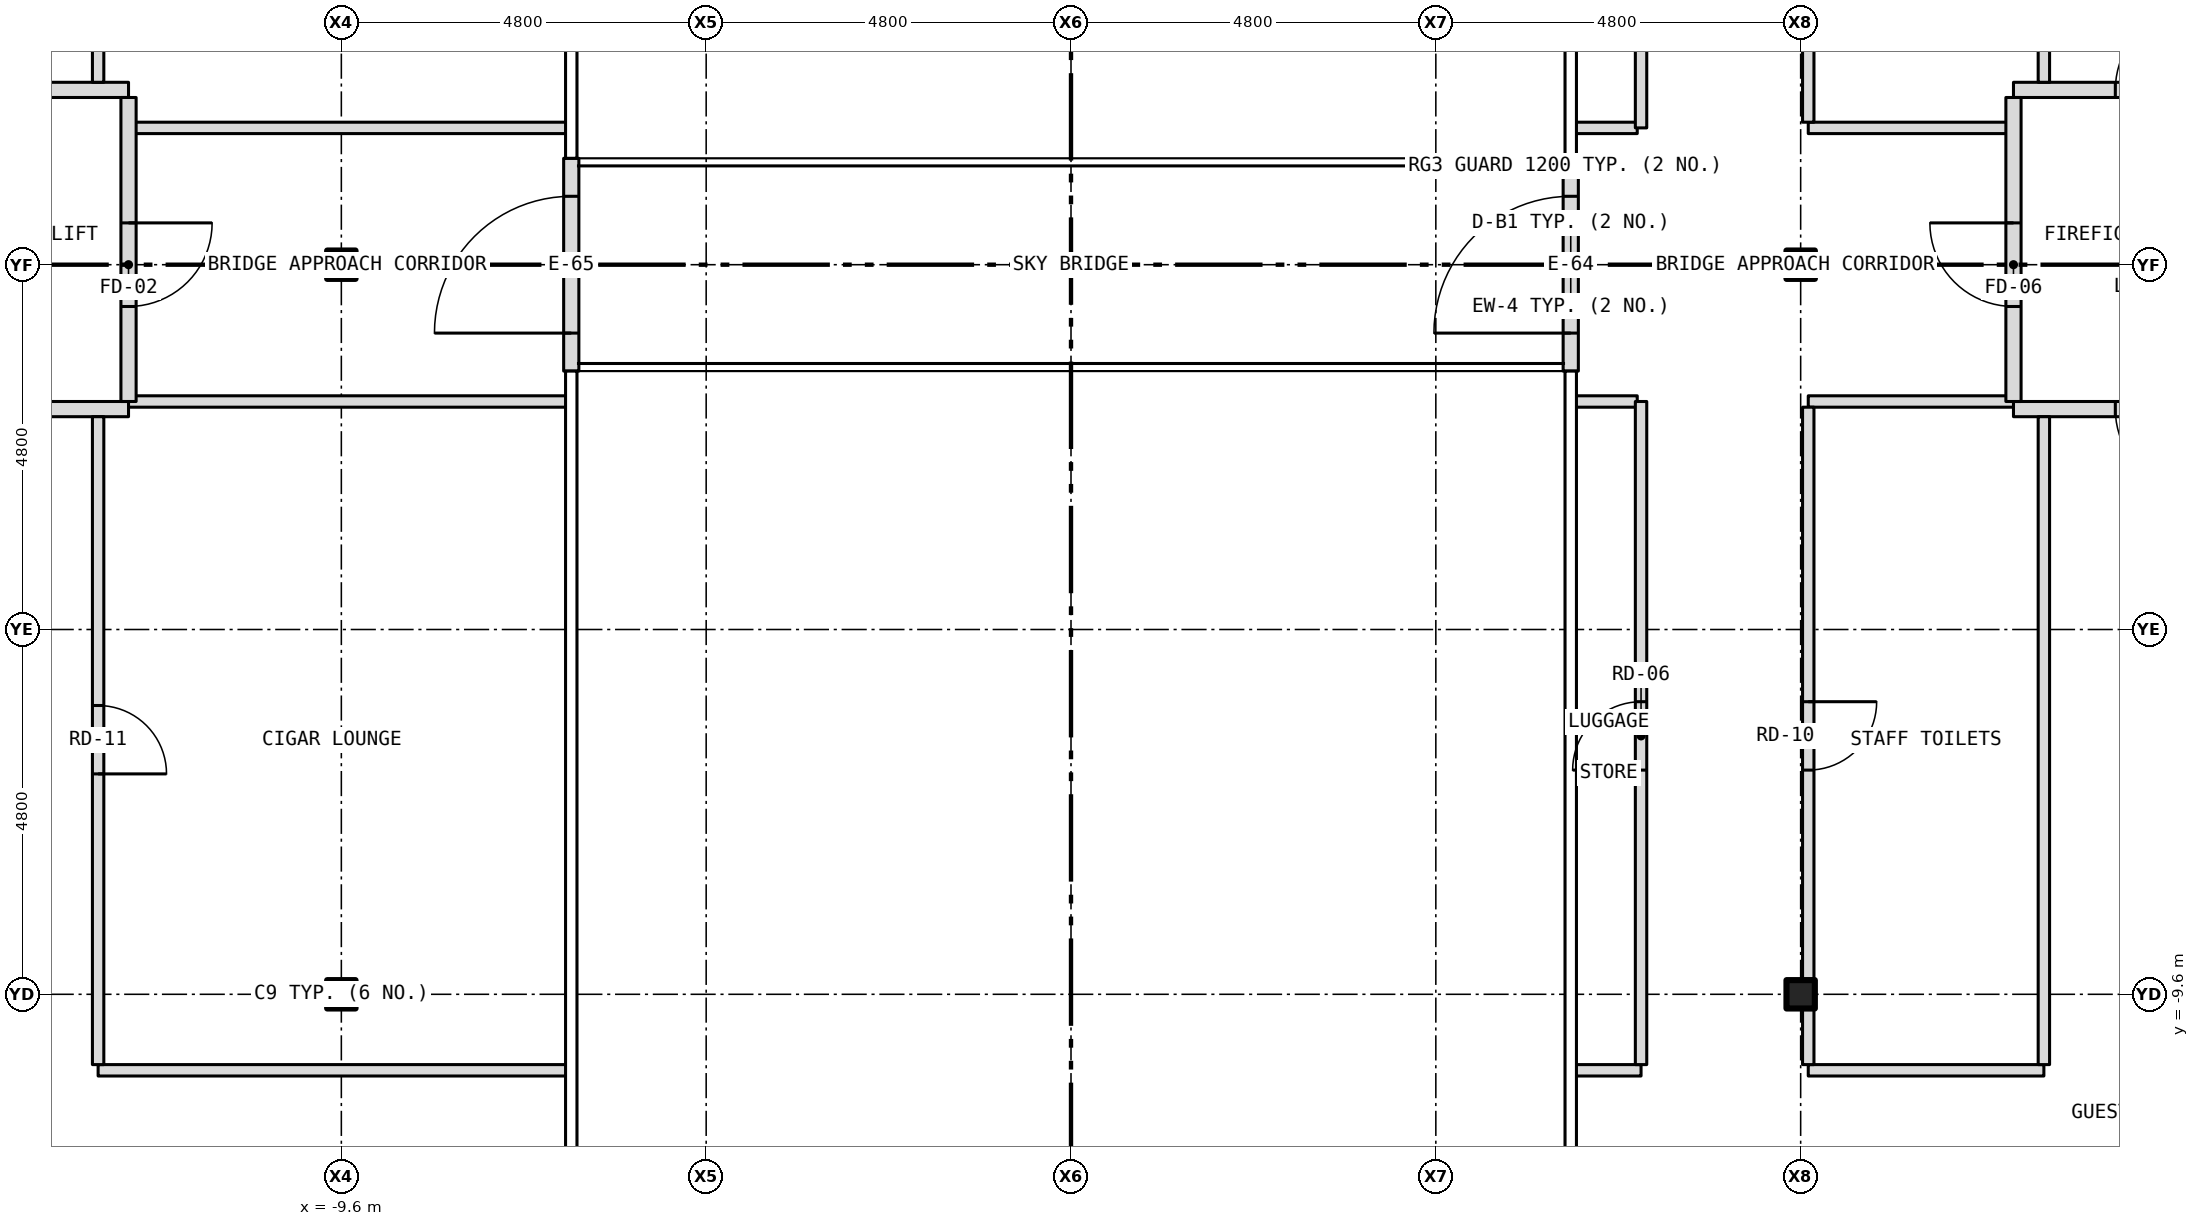
"""IFC4 building model, lengths in metres.
Left out: names, types, materials, properties, quantities, classifications, styles, units other than length and angle.
Written with IfcOpenShell. Run it as: python <this file> out.ifc"""

import sys

from ifc_helpers import new_model, si_unit, direction, frame, frame_2d, origin, origin_2d, place, context, subcontext, project, spatial, rectangle, i_section, extrude, element, fill, save


model = new_model("IFC4")
c1 = context("Model", 3, precision=1e-05, world=origin(), true_north=direction((0.0, 1.0)))
c2 = subcontext(c1, "Body", "Model", "MODEL_VIEW")
j1 = project(units=[si_unit("LENGTHUNIT", "METRE"), si_unit("PLANEANGLEUNIT", "RADIAN")], contexts=[c1])
p1 = place(None, origin())
s1 = spatial("IfcSite", under=j1, at=p1, CompositionType="ELEMENT")
p2 = place(p1, origin())
s2 = spatial("IfcBuilding", under=s1, at=p2, CompositionType="ELEMENT")
p3 = place(p2, frame((0.0, 0.0, 233.0)))
s3 = spatial("IfcBuildingStorey", under=s2, at=p3, CompositionType="ELEMENT", Elevation=233.0)
for number, where, z_axis, x_axis in (
    (1, (-9.6, -9.6, -0.15), (0.0, 0.0, 1.0), (1.0, 0.0, 0.0)),
    (2, (-9.6, 0.0, -0.15), (0.0, 0.0, 1.0), (1.0, 0.0, 0.0)),
    (3, (9.6, -9.6, -0.15), (0.0, 0.0, 1.0), (1.0, 0.0, 0.0)),
    (4, (9.6, 0.0, -0.15), (0.0, 0.0, 1.0), (1.0, 0.0, 0.0)),
):
    element("IfcColumn", number, at=place(p3, frame(where, z_axis=z_axis, x_axis=x_axis)), inside=s3, PredefinedType="COLUMN", context=c2, shape_type="SweptSolid", body=[
        extrude(i_section(OverallWidth=0.373, OverallDepth=0.373, WebThickness=0.016, FlangeThickness=0.026, at=origin_2d()), origin(), (0.0, 0.0, 1.0), 3.35),
    ])
p4 = place(p3, frame((6.575, -1.4, 0.0), z_axis=(0.0, 0.0, 1.0), x_axis=(0.0, 1.0, 0.0)))
e5 = element("IfcWall", 5, at=p4, inside=s3, PredefinedType="SOLIDWALL", context=c2, shape_type="SweptSolid", body=[
    extrude(rectangle(XDim=2.8, YDim=0.2, at=frame_2d((1.4, 0.0))), origin(), (0.0, 0.0, 1.0), 3.5),
])
p5 = place(p4, frame((0.5, 0.0, 0.0)))
e6 = element("IfcOpeningElement", 6, at=p5, cuts=e5, PredefinedType="OPENING", context=c2, shape_type="SweptSolid", body=[
    extrude(rectangle(XDim=1.8, YDim=2.1, at=frame_2d((0.9, 1.05))), frame((0.0, 0.112, 0.0), z_axis=(0.0, -1.0, 0.0), x_axis=(1.0, 0.0, 0.0)), (0.0, 0.0, 1.0), 0.224),
])
p6 = place(p3, frame((-6.575, -1.4, 0.0), z_axis=(0.0, 0.0, 1.0), x_axis=(0.0, 1.0, 0.0)))
e7 = element("IfcWall", 7, at=p6, inside=s3, PredefinedType="SOLIDWALL", context=c2, shape_type="SweptSolid", body=[
    extrude(rectangle(XDim=2.8, YDim=0.2, at=frame_2d((1.4, 0.0))), origin(), (0.0, 0.0, 1.0), 3.5),
])
p7 = place(p6, frame((0.5, 0.0, 0.0)))
e8 = element("IfcOpeningElement", 8, at=p7, cuts=e7, PredefinedType="OPENING", context=c2, shape_type="SweptSolid", body=[
    extrude(rectangle(XDim=1.8, YDim=2.1, at=frame_2d((0.9, 1.05))), frame((0.0, 0.112, 0.0), z_axis=(0.0, -1.0, 0.0), x_axis=(1.0, 0.0, 0.0)), (0.0, 0.0, 1.0), 0.224),
])
p8 = place(p3, frame((-12.8, -10.6, 0.0), z_axis=(0.0, 0.0, 1.0), x_axis=(1.0, 0.0, 0.0)))
e9 = element("IfcWall", 9, at=p8, inside=s3, PredefinedType="PARTITIONING", context=c2, shape_type="SweptSolid", body=[
    extrude(rectangle(XDim=6.18, YDim=0.15, at=frame_2d((3.09, 0.0))), origin(), (0.0, 0.0, 1.0), 3.2),
])
p9 = place(p3, frame((6.62, -10.6, 0.0), z_axis=(0.0, 0.0, 1.0), x_axis=(1.0, 0.0, 0.0)))
e10 = element("IfcWall", 10, at=p9, inside=s3, PredefinedType="PARTITIONING", context=c2, shape_type="SweptSolid", body=[
    extrude(rectangle(XDim=0.88, YDim=0.15, at=frame_2d((0.44, 0.0))), origin(), (0.0, 0.0, 1.0), 3.2),
])
p10 = place(p3, frame((9.7, -10.6, 0.0), z_axis=(0.0, 0.0, 1.0), x_axis=(1.0, 0.0, 0.0)))
e11 = element("IfcWall", 11, at=p10, inside=s3, PredefinedType="PARTITIONING", context=c2, shape_type="SweptSolid", body=[
    extrude(rectangle(XDim=3.1, YDim=0.15, at=frame_2d((1.55, 0.0))), origin(), (0.0, 0.0, 1.0), 3.2),
])
p11 = place(p3, frame((-15.68, -1.9, 0.0), z_axis=(0.0, 0.0, 1.0), x_axis=(1.0, 0.0, 0.0)))
e12 = element("IfcWall", 12, at=p11, inside=s3, PredefinedType="PARTITIONING", context=c2, shape_type="SweptSolid", body=[
    extrude(rectangle(XDim=3.28, YDim=0.2, at=frame_2d((1.64, 0.0))), origin(), (0.0, 0.0, 1.0), 3.2),
])
p12 = place(p11, frame((0.84, 0.0, 0.0)))
e13 = element("IfcOpeningElement", 13, at=p12, cuts=e12, PredefinedType="OPENING", context=c2, shape_type="SweptSolid", body=[
    extrude(rectangle(XDim=1.1, YDim=2.1, at=frame_2d((0.55, 1.05))), frame((0.0, 0.112, 0.0), z_axis=(0.0, -1.0, 0.0), x_axis=(1.0, 0.0, 0.0)), (0.0, 0.0, 1.0), 0.224),
])
p13 = place(p3, frame((12.4, -1.9, 0.0), z_axis=(0.0, 0.0, 1.0), x_axis=(1.0, 0.0, 0.0)))
e14 = element("IfcWall", 14, at=p13, inside=s3, PredefinedType="PARTITIONING", context=c2, shape_type="SweptSolid", body=[
    extrude(rectangle(XDim=3.28, YDim=0.2, at=frame_2d((1.64, 0.0))), origin(), (0.0, 0.0, 1.0), 3.2),
])
p14 = place(p13, frame((1.34, 0.0, 0.0)))
e15 = element("IfcOpeningElement", 15, at=p14, cuts=e14, PredefinedType="OPENING", context=c2, shape_type="SweptSolid", body=[
    extrude(rectangle(XDim=1.1, YDim=2.1, at=frame_2d((0.55, 1.05))), frame((0.0, 0.112, 0.0), z_axis=(0.0, -1.0, 0.0), x_axis=(1.0, 0.0, 0.0)), (0.0, 0.0, 1.0), 0.224),
])
p15 = place(p3, frame((-12.4, -1.8, 0.0), z_axis=(0.0, 0.0, 1.0), x_axis=(1.0, 0.0, 0.0)))
e16 = element("IfcWall", 16, at=p15, inside=s3, PredefinedType="PARTITIONING", context=c2, shape_type="SweptSolid", body=[
    extrude(rectangle(XDim=5.78, YDim=0.15, at=frame_2d((2.89, 0.0))), origin(), (0.0, 0.0, 1.0), 3.2),
])
p16 = place(p3, frame((6.62, -1.8, 0.0), z_axis=(0.0, 0.0, 1.0), x_axis=(1.0, 0.0, 0.0)))
e17 = element("IfcWall", 17, at=p16, inside=s3, PredefinedType="PARTITIONING", context=c2, shape_type="SweptSolid", body=[
    extrude(rectangle(XDim=0.83, YDim=0.15, at=frame_2d((0.415, 0.0))), origin(), (0.0, 0.0, 1.0), 3.2),
])
p17 = place(p3, frame((9.7, -1.8, 0.0), z_axis=(0.0, 0.0, 1.0), x_axis=(1.0, 0.0, 0.0)))
e18 = element("IfcWall", 18, at=p17, inside=s3, PredefinedType="PARTITIONING", context=c2, shape_type="SweptSolid", body=[
    extrude(rectangle(XDim=2.7, YDim=0.15, at=frame_2d((1.35, 0.0))), origin(), (0.0, 0.0, 1.0), 3.2),
])
p18 = place(p3, frame((-12.4, 1.8, 0.0), z_axis=(0.0, 0.0, 1.0), x_axis=(1.0, 0.0, 0.0)))
e19 = element("IfcWall", 19, at=p18, inside=s3, PredefinedType="PARTITIONING", context=c2, shape_type="SweptSolid", body=[
    extrude(rectangle(XDim=5.78, YDim=0.15, at=frame_2d((2.89, 0.0))), origin(), (0.0, 0.0, 1.0), 3.2),
])
p19 = place(p3, frame((6.62, 1.8, 0.0), z_axis=(0.0, 0.0, 1.0), x_axis=(1.0, 0.0, 0.0)))
e20 = element("IfcWall", 20, at=p19, inside=s3, PredefinedType="PARTITIONING", context=c2, shape_type="SweptSolid", body=[
    extrude(rectangle(XDim=0.83, YDim=0.15, at=frame_2d((0.415, 0.0))), origin(), (0.0, 0.0, 1.0), 3.2),
])
p20 = place(p3, frame((9.7, 1.8, 0.0), z_axis=(0.0, 0.0, 1.0), x_axis=(1.0, 0.0, 0.0)))
e21 = element("IfcWall", 21, at=p20, inside=s3, PredefinedType="PARTITIONING", context=c2, shape_type="SweptSolid", body=[
    extrude(rectangle(XDim=2.7, YDim=0.15, at=frame_2d((1.35, 0.0))), origin(), (0.0, 0.0, 1.0), 3.2),
])
p21 = place(p3, frame((-15.68, 2.3, 0.0), z_axis=(0.0, 0.0, 1.0), x_axis=(1.0, 0.0, 0.0)))
e22 = element("IfcWall", 22, at=p21, inside=s3, PredefinedType="PARTITIONING", context=c2, shape_type="SweptSolid", body=[
    extrude(rectangle(XDim=3.28, YDim=0.2, at=frame_2d((1.64, 0.0))), origin(), (0.0, 0.0, 1.0), 3.2),
])
p22 = place(p21, frame((0.84, 0.0, 0.0)))
e23 = element("IfcOpeningElement", 23, at=p22, cuts=e22, PredefinedType="OPENING", context=c2, shape_type="SweptSolid", body=[
    extrude(rectangle(XDim=1.1, YDim=2.1, at=frame_2d((0.55, 1.05))), frame((0.0, 0.112, 0.0), z_axis=(0.0, -1.0, 0.0), x_axis=(1.0, 0.0, 0.0)), (0.0, 0.0, 1.0), 0.224),
])
p23 = place(p3, frame((12.4, 2.3, 0.0), z_axis=(0.0, 0.0, 1.0), x_axis=(1.0, 0.0, 0.0)))
e24 = element("IfcWall", 24, at=p23, inside=s3, PredefinedType="PARTITIONING", context=c2, shape_type="SweptSolid", body=[
    extrude(rectangle(XDim=3.28, YDim=0.2, at=frame_2d((1.64, 0.0))), origin(), (0.0, 0.0, 1.0), 3.2),
])
p24 = place(p23, frame((1.34, 0.0, 0.0)))
e25 = element("IfcOpeningElement", 25, at=p24, cuts=e24, PredefinedType="OPENING", context=c2, shape_type="SweptSolid", body=[
    extrude(rectangle(XDim=1.1, YDim=2.1, at=frame_2d((0.55, 1.05))), frame((0.0, 0.112, 0.0), z_axis=(0.0, -1.0, 0.0), x_axis=(1.0, 0.0, 0.0)), (0.0, 0.0, 1.0), 0.224),
])
p25 = place(p3, frame((-12.8, -10.525, 0.0), z_axis=(0.0, 0.0, 1.0), x_axis=(0.0, 1.0, 0.0)))
e26 = element("IfcWall", 26, at=p25, inside=s3, PredefinedType="PARTITIONING", context=c2, shape_type="SweptSolid", body=[
    extrude(rectangle(XDim=8.525, YDim=0.15, at=frame_2d((4.262, 0.0))), origin(), (0.0, 0.0, 1.0), 3.2),
])
p26 = place(p25, frame((3.825, 0.0, 0.0)))
e27 = element("IfcOpeningElement", 27, at=p26, cuts=e26, PredefinedType="OPENING", context=c2, shape_type="SweptSolid", body=[
    extrude(rectangle(XDim=0.9, YDim=2.1, at=frame_2d((0.45, 1.05))), frame((0.0, 0.087, 0.0), z_axis=(0.0, -1.0, 0.0), x_axis=(1.0, 0.0, 0.0)), (0.0, 0.0, 1.0), 0.174),
])
p27 = place(p3, frame((-12.8, 2.4, 0.0), z_axis=(0.0, 0.0, 1.0), x_axis=(0.0, 1.0, 0.0)))
e28 = element("IfcWall", 28, at=p27, inside=s3, PredefinedType="PARTITIONING", context=c2, shape_type="SweptSolid", body=[
    extrude(rectangle(XDim=3.425, YDim=0.15, at=frame_2d((1.712, 0.0))), origin(), (0.0, 0.0, 1.0), 3.2),
])
p28 = place(p3, frame((-12.4, -1.8, 0.0), z_axis=(0.0, 0.0, 1.0), x_axis=(0.0, 1.0, 0.0)))
e29 = element("IfcWall", 29, at=p28, inside=s3, PredefinedType="PARTITIONING", context=c2, shape_type="SweptSolid", body=[
    extrude(rectangle(XDim=4.0, YDim=0.2, at=frame_2d((2.0, 0.0))), origin(), (0.0, 0.0, 1.0), 3.2),
])
p29 = place(p28, frame((1.25, 0.0, 0.0)))
e30 = element("IfcOpeningElement", 30, at=p29, cuts=e29, PredefinedType="OPENING", context=c2, shape_type="SweptSolid", body=[
    extrude(rectangle(XDim=1.1, YDim=2.1, at=frame_2d((0.55, 1.05))), frame((0.0, 0.112, 0.0), z_axis=(0.0, -1.0, 0.0), x_axis=(1.0, 0.0, 0.0)), (0.0, 0.0, 1.0), 0.224),
])
p30 = place(p3, frame((7.5, -10.525, 0.0), z_axis=(0.0, 0.0, 1.0), x_axis=(0.0, 1.0, 0.0)))
e31 = element("IfcWall", 31, at=p30, inside=s3, PredefinedType="PARTITIONING", context=c2, shape_type="SweptSolid", body=[
    extrude(rectangle(XDim=8.725, YDim=0.15, at=frame_2d((4.362, 0.0))), origin(), (0.0, 0.0, 1.0), 3.2),
])
p31 = place(p30, frame((3.875, 0.0, 0.0)))
e32 = element("IfcOpeningElement", 32, at=p31, cuts=e31, PredefinedType="OPENING", context=c2, shape_type="SweptSolid", body=[
    extrude(rectangle(XDim=0.9, YDim=2.1, at=frame_2d((0.45, 1.05))), frame((0.0, 0.087, 0.0), z_axis=(0.0, -1.0, 0.0), x_axis=(1.0, 0.0, 0.0)), (0.0, 0.0, 1.0), 0.174),
])
p32 = place(p3, frame((7.5, 1.8, 0.0), z_axis=(0.0, 0.0, 1.0), x_axis=(0.0, 1.0, 0.0)))
e33 = element("IfcWall", 33, at=p32, inside=s3, PredefinedType="PARTITIONING", context=c2, shape_type="SweptSolid", body=[
    extrude(rectangle(XDim=4.025, YDim=0.15, at=frame_2d((2.012, 0.0))), origin(), (0.0, 0.0, 1.0), 3.2),
])
p33 = place(p32, frame((1.6, 0.0, 0.0)))
e34 = element("IfcOpeningElement", 34, at=p33, cuts=e33, PredefinedType="OPENING", context=c2, shape_type="SweptSolid", body=[
    extrude(rectangle(XDim=0.9, YDim=2.1, at=frame_2d((0.45, 1.05))), frame((0.0, 0.087, 0.0), z_axis=(0.0, -1.0, 0.0), x_axis=(1.0, 0.0, 0.0)), (0.0, 0.0, 1.0), 0.174),
])
p34 = place(p3, frame((9.7, -10.525, 0.0), z_axis=(0.0, 0.0, 1.0), x_axis=(0.0, 1.0, 0.0)))
e35 = element("IfcWall", 35, at=p34, inside=s3, PredefinedType="PARTITIONING", context=c2, shape_type="SweptSolid", body=[
    extrude(rectangle(XDim=0.725, YDim=0.15, at=frame_2d((0.362, 0.0))), origin(), (0.0, 0.0, 1.0), 2.578),
])
p35 = place(p3, frame((9.7, -9.8, 0.0), z_axis=(0.0, 0.0, 1.0), x_axis=(0.0, 1.0, 0.0)))
e36 = element("IfcWall", 36, at=p35, inside=s3, PredefinedType="PARTITIONING", context=c2, shape_type="SweptSolid", body=[
    extrude(rectangle(XDim=0.401, YDim=0.15, at=frame_2d((0.201, 0.0))), origin(), (0.0, 0.0, 1.0), 3.2),
])
p36 = place(p3, frame((9.7, -9.399, 0.0), z_axis=(0.0, 0.0, 1.0), x_axis=(0.0, 1.0, 0.0)))
e37 = element("IfcWall", 37, at=p36, inside=s3, PredefinedType="PARTITIONING", context=c2, shape_type="SweptSolid", body=[
    extrude(rectangle(XDim=7.524, YDim=0.15, at=frame_2d((3.762, 0.0))), origin(), (0.0, 0.0, 1.0), 2.578),
])
p37 = place(p36, frame((2.749, 0.0, 0.0)))
e38 = element("IfcOpeningElement", 38, at=p37, cuts=e37, PredefinedType="OPENING", context=c2, shape_type="SweptSolid", body=[
    extrude(rectangle(XDim=0.9, YDim=2.1, at=frame_2d((0.45, 1.05))), frame((0.0, 0.087, 0.0), z_axis=(0.0, -1.0, 0.0), x_axis=(1.0, 0.0, 0.0)), (0.0, 0.0, 1.0), 0.174),
])
p38 = place(p3, frame((9.7, 1.875, 0.0), z_axis=(0.0, 0.0, 1.0), x_axis=(0.0, 1.0, 0.0)))
e39 = element("IfcWall", 39, at=p38, inside=s3, PredefinedType="PARTITIONING", context=c2, shape_type="SweptSolid", body=[
    extrude(rectangle(XDim=3.95, YDim=0.15, at=frame_2d((1.975, 0.0))), origin(), (0.0, 0.0, 1.0), 2.578),
])
p39 = place(p38, frame((1.525, 0.0, 0.0)))
e40 = element("IfcOpeningElement", 40, at=p39, cuts=e39, PredefinedType="OPENING", context=c2, shape_type="SweptSolid", body=[
    extrude(rectangle(XDim=0.9, YDim=2.1, at=frame_2d((0.45, 1.05))), frame((0.0, 0.087, 0.0), z_axis=(0.0, -1.0, 0.0), x_axis=(1.0, 0.0, 0.0)), (0.0, 0.0, 1.0), 0.174),
])
p40 = place(p3, frame((12.4, -1.8, 0.0), z_axis=(0.0, 0.0, 1.0), x_axis=(0.0, 1.0, 0.0)))
e41 = element("IfcWall", 41, at=p40, inside=s3, PredefinedType="PARTITIONING", context=c2, shape_type="SweptSolid", body=[
    extrude(rectangle(XDim=4.0, YDim=0.2, at=frame_2d((2.0, 0.0))), origin(), (0.0, 0.0, 1.0), 3.2),
])
p41 = place(p40, frame((1.25, 0.0, 0.0)))
e42 = element("IfcOpeningElement", 42, at=p41, cuts=e41, PredefinedType="OPENING", context=c2, shape_type="SweptSolid", body=[
    extrude(rectangle(XDim=1.1, YDim=2.1, at=frame_2d((0.55, 1.05))), frame((0.0, 0.112, 0.0), z_axis=(0.0, -1.0, 0.0), x_axis=(1.0, 0.0, 0.0)), (0.0, 0.0, 1.0), 0.224),
])
p42 = place(p3, frame((12.8, -10.525, 0.0), z_axis=(0.0, 0.0, 1.0), x_axis=(0.0, 1.0, 0.0)))
e43 = element("IfcWall", 43, at=p42, inside=s3, PredefinedType="PARTITIONING", context=c2, shape_type="SweptSolid", body=[
    extrude(rectangle(XDim=8.525, YDim=0.15, at=frame_2d((4.262, 0.0))), origin(), (0.0, 0.0, 1.0), 3.2),
])
p43 = place(p3, frame((12.8, 2.4, 0.0), z_axis=(0.0, 0.0, 1.0), x_axis=(0.0, 1.0, 0.0)))
e44 = element("IfcWall", 44, at=p43, inside=s3, PredefinedType="PARTITIONING", context=c2, shape_type="SweptSolid", body=[
    extrude(rectangle(XDim=3.425, YDim=0.15, at=frame_2d((1.712, 0.0))), origin(), (0.0, 0.0, 1.0), 3.2),
])
p44 = place(p5, origin())
e45 = element("IfcDoor", 45, at=p44, inside=s3, OperationType="DOUBLE_DOOR_DOUBLE_SWING", PredefinedType="DOOR", context=c2, shape_type="SweptSolid", body=[
    extrude(rectangle(XDim=1.8, YDim=2.1, at=frame_2d((0.9, 1.05))), frame((0.0, 0.025, 0.0), z_axis=(0.0, -1.0, 0.0), x_axis=(1.0, 0.0, 0.0)), (0.0, 0.0, 1.0), 0.05),
])
fill(e6, e45)
p45 = place(p7, origin())
e46 = element("IfcDoor", 46, at=p45, inside=s3, OperationType="DOUBLE_DOOR_DOUBLE_SWING", PredefinedType="DOOR", context=c2, shape_type="SweptSolid", body=[
    extrude(rectangle(XDim=1.8, YDim=2.1, at=frame_2d((0.9, 1.05))), frame((0.0, 0.025, 0.0), z_axis=(0.0, -1.0, 0.0), x_axis=(1.0, 0.0, 0.0)), (0.0, 0.0, 1.0), 0.05),
])
fill(e8, e46)
p46 = place(p29, origin())
e47 = element("IfcDoor", 47, at=p46, inside=s3, OperationType="SINGLE_SWING_RIGHT", PredefinedType="DOOR", context=c2, shape_type="SweptSolid", body=[
    extrude(rectangle(XDim=1.1, YDim=2.1, at=frame_2d((0.55, 1.05))), frame((0.0, 0.025, 0.0), z_axis=(0.0, -1.0, 0.0), x_axis=(1.0, 0.0, 0.0)), (0.0, 0.0, 1.0), 0.05),
])
fill(e30, e47)
p47 = place(p41, origin())
e48 = element("IfcDoor", 48, at=p47, inside=s3, OperationType="SINGLE_SWING_RIGHT", PredefinedType="DOOR", context=c2, shape_type="SweptSolid", body=[
    extrude(rectangle(XDim=1.1, YDim=2.1, at=frame_2d((0.55, 1.05))), frame((0.0, 0.025, 0.0), z_axis=(0.0, -1.0, 0.0), x_axis=(1.0, 0.0, 0.0)), (0.0, 0.0, 1.0), 0.05),
])
fill(e42, e48)
p48 = place(p14, origin())
e49 = element("IfcDoor", 49, at=p48, inside=s3, OperationType="SINGLE_SWING_RIGHT", PredefinedType="DOOR", context=c2, shape_type="SweptSolid", body=[
    extrude(rectangle(XDim=1.1, YDim=2.1, at=frame_2d((0.55, 1.05))), frame((0.0, 0.025, 0.0), z_axis=(0.0, -1.0, 0.0), x_axis=(1.0, 0.0, 0.0)), (0.0, 0.0, 1.0), 0.05),
])
fill(e15, e49)
p49 = place(p24, origin())
e50 = element("IfcDoor", 50, at=p49, inside=s3, OperationType="SINGLE_SWING_RIGHT", PredefinedType="DOOR", context=c2, shape_type="SweptSolid", body=[
    extrude(rectangle(XDim=1.1, YDim=2.1, at=frame_2d((0.55, 1.05))), frame((0.0, 0.025, 0.0), z_axis=(0.0, -1.0, 0.0), x_axis=(1.0, 0.0, 0.0)), (0.0, 0.0, 1.0), 0.05),
])
fill(e25, e50)
p50 = place(p31, origin())
e51 = element("IfcDoor", 51, at=p50, inside=s3, OperationType="SINGLE_SWING_LEFT", PredefinedType="DOOR", context=c2, shape_type="SweptSolid", body=[
    extrude(rectangle(XDim=0.9, YDim=2.1, at=frame_2d((0.45, 1.05))), frame((0.0, 0.025, 0.0), z_axis=(0.0, -1.0, 0.0), x_axis=(1.0, 0.0, 0.0)), (0.0, 0.0, 1.0), 0.05),
])
fill(e32, e51)
p51 = place(p37, origin())
e52 = element("IfcDoor", 52, at=p51, inside=s3, OperationType="SINGLE_SWING_RIGHT", PredefinedType="DOOR", context=c2, shape_type="SweptSolid", body=[
    extrude(rectangle(XDim=0.9, YDim=2.1, at=frame_2d((0.45, 1.05))), frame((0.0, 0.025, 0.0), z_axis=(0.0, -1.0, 0.0), x_axis=(1.0, 0.0, 0.0)), (0.0, 0.0, 1.0), 0.05),
])
fill(e38, e52)
p52 = place(p26, origin())
e53 = element("IfcDoor", 53, at=p52, inside=s3, OperationType="SINGLE_SWING_LEFT", PredefinedType="DOOR", context=c2, shape_type="SweptSolid", body=[
    extrude(rectangle(XDim=0.9, YDim=2.1, at=frame_2d((0.45, 1.05))), frame((0.0, 0.025, 0.0), z_axis=(0.0, -1.0, 0.0), x_axis=(1.0, 0.0, 0.0)), (0.0, 0.0, 1.0), 0.05),
])
fill(e27, e53)
save(model, sys.argv[1])
